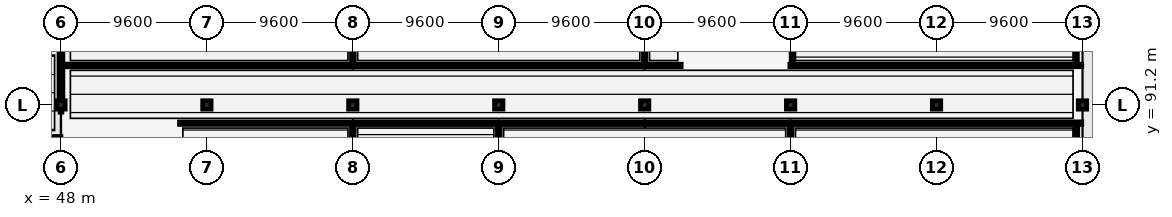
"""IFC4 building model, lengths in metres.
Left out: names, types, materials, properties, quantities, classifications, styles, units other than length and angle.
Written with IfcOpenShell. Run it as: python <this file> out.ifc"""

import sys

from ifc_helpers import new_model, si_unit, direction, frame, frame_2d, origin, origin_2d, place, context, subcontext, project, spatial, rectangle, extrude, element, fill, save


model = new_model("IFC4")
c1 = context("Model", 3, precision=1e-05, world=origin(), true_north=direction((0.0, 1.0)))
c2 = subcontext(c1, "Body", "Model", "MODEL_VIEW")
j1 = project(units=[si_unit("LENGTHUNIT", "METRE"), si_unit("PLANEANGLEUNIT", "RADIAN")], contexts=[c1])
p1 = place(None, origin())
s1 = spatial("IfcSite", under=j1, at=p1, CompositionType="ELEMENT")
p2 = place(p1, origin())
s2 = spatial("IfcBuilding", under=s1, at=p2, CompositionType="ELEMENT")
p3 = place(p2, frame((0.0, 0.0, 4.8)))
s3 = spatial("IfcBuildingStorey", under=s2, at=p3, CompositionType="ELEMENT", Elevation=4.8)
for number, where, z_axis, x_axis in (
    (1, (48.0, 91.2, 0.0), (0.0, 0.0, 1.0), (1.0, 0.0, 0.0)),
    (2, (57.6, 91.2, 0.0), (0.0, 0.0, 1.0), (1.0, 0.0, 0.0)),
    (3, (67.2, 91.2, 0.0), (0.0, 0.0, 1.0), (1.0, 0.0, 0.0)),
    (4, (76.8, 91.2, 0.0), (0.0, 0.0, 1.0), (1.0, 0.0, 0.0)),
    (5, (86.4, 91.2, 0.0), (0.0, 0.0, 1.0), (1.0, 0.0, 0.0)),
    (6, (96.0, 91.2, 0.0), (0.0, 0.0, 1.0), (1.0, 0.0, 0.0)),
    (7, (105.6, 91.2, 0.0), (0.0, 0.0, 1.0), (1.0, 0.0, 0.0)),
    (8, (115.2, 91.2, 0.0), (0.0, 0.0, 1.0), (1.0, 0.0, 0.0)),
):
    element("IfcColumn", number, at=place(p3, frame(where, z_axis=z_axis, x_axis=x_axis)), inside=s3, PredefinedType="COLUMN", context=c2, shape_type="SweptSolid", body=[
        extrude(rectangle(XDim=0.55, YDim=0.55, at=origin_2d()), origin(), (0.0, 0.0, 1.0), 4.8),
    ])
p4 = place(p3, frame((48.0, 91.475, 0.0), z_axis=(0.0, 0.0, 1.0), x_axis=(0.0, 1.0, 0.0)))
e9 = element("IfcWall", 9, at=p4, inside=s3, PredefinedType="STANDARD", context=c2, shape_type="SweptSolid", body=[
    extrude(rectangle(XDim=9.05, YDim=0.25, at=frame_2d((4.525, 0.0))), origin(), (0.0, 0.0, 1.0), 4.046),
])
p5 = place(p4, frame((6.2, 0.0, 1.05)))
e10 = element("IfcOpeningElement", 10, at=p5, cuts=e9, PredefinedType="OPENING", context=c2, shape_type="SweptSolid", body=[
    extrude(rectangle(XDim=1.12, YDim=1.44, at=frame_2d((0.56, 0.72))), frame((0.0, 0.135, 0.0), z_axis=(0.0, -1.0, 0.0), x_axis=(1.0, 0.0, 0.0)), (0.0, 0.0, 1.0), 0.27),
])
p6 = place(p4, frame((0.35, 0.0, 0.0)))
e11 = element("IfcOpeningElement", 11, at=p6, cuts=e9, PredefinedType="OPENING", context=c2, shape_type="SweptSolid", body=[
    extrude(rectangle(XDim=1.25, YDim=2.15, at=frame_2d((0.625, 1.075))), frame((0.0, 0.135, 0.0), z_axis=(0.0, -1.0, 0.0), x_axis=(1.0, 0.0, 0.0)), (0.0, 0.0, 1.0), 0.27),
])
p7 = place(p3, frame((38.4, 89.0, 0.0), z_axis=(0.0, 0.0, 1.0), x_axis=(1.0, 0.0, 0.0)))
e12 = element("IfcWall", 12, at=p7, inside=s3, PredefinedType="STANDARD", context=c2, shape_type="SweptSolid", body=[
    extrude(rectangle(XDim=9.6, YDim=0.25, at=frame_2d((4.8, 0.0))), origin(), (0.0, 0.0, 1.0), 2.106),
])
p8 = place(p3, frame((67.2, 81.4, 0.0), z_axis=(0.0, 0.0, 1.0), x_axis=(0.0, 1.0, 0.0)))
e13 = element("IfcWall", 13, at=p8, inside=s3, PredefinedType="PARTITIONING", context=c2, shape_type="SweptSolid", body=[
    extrude(rectangle(XDim=8.5, YDim=0.175, at=frame_2d((4.25, 0.0))), origin(), (0.0, 0.0, 1.0), 4.037),
])
p9 = place(p8, frame((3.45, 0.0, 0.0)))
e14 = element("IfcOpeningElement", 14, at=p9, cuts=e13, PredefinedType="OPENING", context=c2, shape_type="SweptSolid", body=[
    extrude(rectangle(XDim=1.6, YDim=2.15, at=frame_2d((0.8, 1.075))), frame((0.0, 0.097, 0.0), z_axis=(0.0, -1.0, 0.0), x_axis=(1.0, 0.0, 0.0)), (0.0, 0.0, 1.0), 0.195),
])
p10 = place(p3, frame((55.8, 90.0, 0.0), z_axis=(0.0, 0.0, 1.0), x_axis=(1.0, 0.0, 0.0)))
e15 = element("IfcWall", 15, at=p10, inside=s3, PredefinedType="PARTITIONING", context=c2, shape_type="SweptSolid", body=[
    extrude(rectangle(XDim=11.3, YDim=0.16, at=frame_2d((5.65, 0.0))), origin(), (0.0, 0.0, 1.0), 4.42),
])
p11 = place(p10, frame((4.75, 0.0, 0.0)))
e16 = element("IfcOpeningElement", 16, at=p11, cuts=e15, PredefinedType="OPENING", context=c2, shape_type="SweptSolid", body=[
    extrude(rectangle(XDim=1.8, YDim=2.15, at=frame_2d((0.9, 1.075))), frame((0.0, 0.09, 0.0), z_axis=(0.0, -1.0, 0.0), x_axis=(1.0, 0.0, 0.0)), (0.0, 0.0, 1.0), 0.18),
])
p12 = place(p3, frame((76.8, 81.4, 0.0), z_axis=(0.0, 0.0, 1.0), x_axis=(0.0, 1.0, 0.0)))
e17 = element("IfcWall", 17, at=p12, inside=s3, PredefinedType="PARTITIONING", context=c2, shape_type="SweptSolid", body=[
    extrude(rectangle(XDim=8.5, YDim=0.175, at=frame_2d((4.25, 0.0))), origin(), (0.0, 0.0, 1.0), 4.037),
])
p13 = place(p3, frame((67.3, 90.0, 0.0), z_axis=(0.0, 0.0, 1.0), x_axis=(1.0, 0.0, 0.0)))
e18 = element("IfcWall", 18, at=p13, inside=s3, PredefinedType="PARTITIONING", context=c2, shape_type="SweptSolid", body=[
    extrude(rectangle(XDim=9.4, YDim=0.175, at=frame_2d((4.7, 0.0))), origin(), (0.0, 0.0, 1.0), 4.42),
])
p14 = place(p13, frame((3.9, 0.0, 0.0)))
e19 = element("IfcOpeningElement", 19, at=p14, cuts=e18, PredefinedType="OPENING", context=c2, shape_type="SweptSolid", body=[
    extrude(rectangle(XDim=1.6, YDim=2.15, at=frame_2d((0.8, 1.075))), frame((0.0, 0.097, 0.0), z_axis=(0.0, -1.0, 0.0), x_axis=(1.0, 0.0, 0.0)), (0.0, 0.0, 1.0), 0.195),
])
p15 = place(p3, frame((96.0, 72.05, 0.0), z_axis=(0.0, 0.0, 1.0), x_axis=(0.0, 1.0, 0.0)))
e20 = element("IfcWall", 20, at=p15, inside=s3, PredefinedType="PARTITIONING", context=c2, shape_type="SweptSolid", body=[
    extrude(rectangle(XDim=17.85, YDim=0.175, at=frame_2d((8.925, 0.0))), origin(), (0.0, 0.0, 1.0), 4.037),
])
p16 = place(p3, frame((76.9, 90.0, 0.0), z_axis=(0.0, 0.0, 1.0), x_axis=(1.0, 0.0, 0.0)))
e21 = element("IfcWall", 21, at=p16, inside=s3, PredefinedType="PARTITIONING", context=c2, shape_type="SweptSolid", body=[
    extrude(rectangle(XDim=19.05, YDim=0.175, at=frame_2d((9.525, 0.0))), origin(), (0.0, 0.0, 1.0), 4.42),
])
p17 = place(p16, frame((6.216, 0.0, 0.0)))
e22 = element("IfcOpeningElement", 22, at=p17, cuts=e21, PredefinedType="OPENING", context=c2, shape_type="SweptSolid", body=[
    extrude(rectangle(XDim=1.6, YDim=2.15, at=frame_2d((0.8, 1.075))), frame((0.0, 0.097, 0.0), z_axis=(0.0, -1.0, 0.0), x_axis=(1.0, 0.0, 0.0)), (0.0, 0.0, 1.0), 0.195),
])
p18 = place(p3, frame((96.03, 90.0, 0.0), z_axis=(0.0, 0.0, 1.0), x_axis=(1.0, 0.0, 0.0)))
e23 = element("IfcWall", 23, at=p18, inside=s3, PredefinedType="PARTITIONING", context=c2, shape_type="SweptSolid", body=[
    extrude(rectangle(XDim=19.12, YDim=0.175, at=frame_2d((9.56, 0.0))), origin(), (0.0, 0.0, 1.0), 4.42),
])
p19 = place(p18, frame((6.24, 0.0, 0.0)))
e24 = element("IfcOpeningElement", 24, at=p19, cuts=e23, PredefinedType="OPENING", context=c2, shape_type="SweptSolid", body=[
    extrude(rectangle(XDim=1.6, YDim=2.15, at=frame_2d((0.8, 1.075))), frame((0.0, 0.097, 0.0), z_axis=(0.0, -1.0, 0.0), x_axis=(1.0, 0.0, 0.0)), (0.0, 0.0, 1.0), 0.195),
])
p20 = place(p3, frame((86.5, 93.8, 0.0), z_axis=(0.0, 0.0, 1.0), x_axis=(1.0, 0.0, 0.0)))
e25 = element("IfcWall", 25, at=p20, inside=s3, PredefinedType="PARTITIONING", context=c2, shape_type="SweptSolid", body=[
    extrude(rectangle(XDim=2.3, YDim=0.16, at=frame_2d((1.15, 0.0))), origin(), (0.0, 0.0, 1.0), 4.42),
])
p21 = place(p20, frame((0.25, 0.0, 0.0)))
e26 = element("IfcOpeningElement", 26, at=p21, cuts=e25, PredefinedType="OPENING", context=c2, shape_type="SweptSolid", body=[
    extrude(rectangle(XDim=1.8, YDim=2.15, at=frame_2d((0.9, 1.075))), frame((0.0, 0.09, 0.0), z_axis=(0.0, -1.0, 0.0), x_axis=(1.0, 0.0, 0.0)), (0.0, 0.0, 1.0), 0.18),
])
p22 = place(p3, frame((48.05, 93.8, 0.0), z_axis=(0.0, 0.0, 1.0), x_axis=(1.0, 0.0, 0.0)))
e27 = element("IfcWall", 27, at=p22, inside=s3, PredefinedType="PARTITIONING", context=c2, shape_type="SweptSolid", body=[
    extrude(rectangle(XDim=19.05, YDim=0.175, at=frame_2d((9.525, 0.0))), origin(), (0.0, 0.0, 1.0), 4.42),
])
p23 = place(p22, frame((8.725, 0.0, 0.0)))
e28 = element("IfcOpeningElement", 28, at=p23, cuts=e27, PredefinedType="OPENING", context=c2, shape_type="SweptSolid", body=[
    extrude(rectangle(XDim=1.6, YDim=2.15, at=frame_2d((0.8, 1.075))), frame((0.0, 0.097, 0.0), z_axis=(0.0, -1.0, 0.0), x_axis=(1.0, 0.0, 0.0)), (0.0, 0.0, 1.0), 0.195),
])
p24 = place(p3, frame((67.3, 93.8, 0.0), z_axis=(0.0, 0.0, 1.0), x_axis=(1.0, 0.0, 0.0)))
e29 = element("IfcWall", 29, at=p24, inside=s3, PredefinedType="PARTITIONING", context=c2, shape_type="SweptSolid", body=[
    extrude(rectangle(XDim=19.0, YDim=0.16, at=frame_2d((9.5, 0.0))), origin(), (0.0, 0.0, 1.0), 4.42),
])
p25 = place(p24, frame((8.925, 0.0, 0.0)))
e30 = element("IfcOpeningElement", 30, at=p25, cuts=e29, PredefinedType="OPENING", context=c2, shape_type="SweptSolid", body=[
    extrude(rectangle(XDim=1.15, YDim=2.2, at=frame_2d((0.575, 1.1))), frame((0.0, 0.09, 0.0), z_axis=(0.0, -1.0, 0.0), x_axis=(1.0, 0.0, 0.0)), (0.0, 0.0, 1.0), 0.18),
])
p26 = place(p3, frame((95.95, 93.8, 0.0), z_axis=(0.0, 0.0, 1.0), x_axis=(1.0, 0.0, 0.0)))
e31 = element("IfcWall", 31, at=p26, inside=s3, PredefinedType="PARTITIONING", context=c2, shape_type="SweptSolid", body=[
    extrude(rectangle(XDim=19.2, YDim=0.16, at=frame_2d((9.6, 0.0))), origin(), (0.0, 0.0, 1.0), 4.42),
])
p27 = place(p26, frame((9.08, 0.0, 0.0)))
e32 = element("IfcOpeningElement", 32, at=p27, cuts=e31, PredefinedType="OPENING", context=c2, shape_type="SweptSolid", body=[
    extrude(rectangle(XDim=1.04, YDim=2.18, at=frame_2d((0.52, 1.09))), frame((0.0, 0.09, 0.0), z_axis=(0.0, -1.0, 0.0), x_axis=(1.0, 0.0, 0.0)), (0.0, 0.0, 1.0), 0.18),
])
p28 = place(p3, frame((86.4, 93.9, 0.0), z_axis=(0.0, 0.0, 1.0), x_axis=(0.0, 1.0, 0.0)))
e33 = element("IfcWall", 33, at=p28, inside=s3, PredefinedType="PARTITIONING", context=c2, shape_type="SweptSolid", body=[
    extrude(rectangle(XDim=24.05, YDim=0.16, at=frame_2d((12.025, 0.0))), origin(), (0.0, 0.0, 1.0), 4.037),
])
p29 = place(p28, frame((11.45, 0.0, 0.0)))
e34 = element("IfcOpeningElement", 34, at=p29, cuts=e33, PredefinedType="OPENING", context=c2, shape_type="SweptSolid", body=[
    extrude(rectangle(XDim=1.15, YDim=2.2, at=frame_2d((0.575, 1.1))), frame((0.0, 0.09, 0.0), z_axis=(0.0, -1.0, 0.0), x_axis=(1.0, 0.0, 0.0)), (0.0, 0.0, 1.0), 0.18),
])
p30 = place(p3, frame((67.2, 93.9, 0.0), z_axis=(0.0, 0.0, 1.0), x_axis=(0.0, 1.0, 0.0)))
e35 = element("IfcWall", 35, at=p30, inside=s3, PredefinedType="PARTITIONING", context=c2, shape_type="SweptSolid", body=[
    extrude(rectangle(XDim=24.05, YDim=0.175, at=frame_2d((12.025, 0.0))), origin(), (0.0, 0.0, 1.0), 4.037),
])
p31 = place(p3, frame((114.8, 72.05, 0.0), z_axis=(0.0, 0.0, 1.0), x_axis=(0.0, 1.0, 0.0)))
e36 = element("IfcWall", 36, at=p31, inside=s3, PredefinedType="PARTITIONING", context=c2, shape_type="SweptSolid", body=[
    extrude(rectangle(XDim=17.71, YDim=0.175, at=frame_2d((8.855, 0.0))), origin(), (0.0, 0.0, 1.0), 4.42),
])
p32 = place(p3, frame((96.1, 94.04, 0.0), z_axis=(0.0, 0.0, 1.0), x_axis=(0.0, 1.0, 0.0)))
e37 = element("IfcWall", 37, at=p32, inside=s3, PredefinedType="PARTITIONING", context=c2, shape_type="SweptSolid", body=[
    extrude(rectangle(XDim=12.62, YDim=0.125, at=frame_2d((6.31, 0.0))), origin(), (0.0, 0.0, 1.0), 4.037),
])
p33 = place(p3, frame((114.8, 94.04, 0.0), z_axis=(0.0, 0.0, 1.0), x_axis=(0.0, 1.0, 0.0)))
e38 = element("IfcWall", 38, at=p33, inside=s3, PredefinedType="PARTITIONING", context=c2, shape_type="SweptSolid", body=[
    extrude(rectangle(XDim=12.62, YDim=0.125, at=frame_2d((6.31, 0.0))), origin(), (0.0, 0.0, 1.0), 4.42),
])
p34 = place(p11, origin())
e39 = element("IfcDoor", 39, at=p34, inside=s3, OperationType="DOUBLE_DOOR_SINGLE_SWING", PredefinedType="DOOR", context=c2, shape_type="SweptSolid", body=[
    extrude(rectangle(XDim=1.8, YDim=2.15, at=frame_2d((0.9, 1.075))), frame((0.0, 0.025, 0.0), z_axis=(0.0, -1.0, 0.0), x_axis=(1.0, 0.0, 0.0)), (0.0, 0.0, 1.0), 0.05),
])
fill(e16, e39)
p35 = place(p14, origin())
e40 = element("IfcDoor", 40, at=p35, inside=s3, OperationType="DOUBLE_DOOR_SINGLE_SWING", PredefinedType="DOOR", context=c2, shape_type="SweptSolid", body=[
    extrude(rectangle(XDim=1.6, YDim=2.15, at=frame_2d((0.8, 1.075))), frame((0.0, 0.025, 0.0), z_axis=(0.0, -1.0, 0.0), x_axis=(1.0, 0.0, 0.0)), (0.0, 0.0, 1.0), 0.05),
])
fill(e19, e40)
p36 = place(p17, origin())
e41 = element("IfcDoor", 41, at=p36, inside=s3, OperationType="DOUBLE_DOOR_SINGLE_SWING", PredefinedType="DOOR", context=c2, shape_type="SweptSolid", body=[
    extrude(rectangle(XDim=1.6, YDim=2.15, at=frame_2d((0.8, 1.075))), frame((0.0, 0.025, 0.0), z_axis=(0.0, -1.0, 0.0), x_axis=(1.0, 0.0, 0.0)), (0.0, 0.0, 1.0), 0.05),
])
fill(e22, e41)
p37 = place(p19, origin())
e42 = element("IfcDoor", 42, at=p37, inside=s3, OperationType="DOUBLE_DOOR_SINGLE_SWING", PredefinedType="DOOR", context=c2, shape_type="SweptSolid", body=[
    extrude(rectangle(XDim=1.6, YDim=2.15, at=frame_2d((0.8, 1.075))), frame((0.0, 0.025, 0.0), z_axis=(0.0, -1.0, 0.0), x_axis=(1.0, 0.0, 0.0)), (0.0, 0.0, 1.0), 0.05),
])
fill(e24, e42)
p38 = place(p21, origin())
e43 = element("IfcDoor", 43, at=p38, inside=s3, OperationType="DOUBLE_DOOR_SINGLE_SWING", PredefinedType="DOOR", context=c2, shape_type="SweptSolid", body=[
    extrude(rectangle(XDim=1.8, YDim=2.15, at=frame_2d((0.9, 1.075))), frame((0.0, 0.025, 0.0), z_axis=(0.0, -1.0, 0.0), x_axis=(1.0, 0.0, 0.0)), (0.0, 0.0, 1.0), 0.05),
])
fill(e26, e43)
p39 = place(p23, origin())
e44 = element("IfcDoor", 44, at=p39, inside=s3, OperationType="DOUBLE_DOOR_SINGLE_SWING", PredefinedType="DOOR", context=c2, shape_type="SweptSolid", body=[
    extrude(rectangle(XDim=1.6, YDim=2.15, at=frame_2d((0.8, 1.075))), frame((0.0, 0.025, 0.0), z_axis=(0.0, -1.0, 0.0), x_axis=(1.0, 0.0, 0.0)), (0.0, 0.0, 1.0), 0.05),
])
fill(e28, e44)
p40 = place(p25, origin())
e45 = element("IfcDoor", 45, at=p40, inside=s3, OperationType="SINGLE_SWING_LEFT", PredefinedType="DOOR", context=c2, shape_type="SweptSolid", body=[
    extrude(rectangle(XDim=1.15, YDim=2.2, at=frame_2d((0.575, 1.1))), frame((0.0, 0.025, 0.0), z_axis=(0.0, -1.0, 0.0), x_axis=(1.0, 0.0, 0.0)), (0.0, 0.0, 1.0), 0.05),
])
fill(e30, e45)
p41 = place(p27, origin())
e46 = element("IfcDoor", 46, at=p41, inside=s3, OperationType="SINGLE_SWING_RIGHT", PredefinedType="DOOR", context=c2, shape_type="SweptSolid", body=[
    extrude(rectangle(XDim=1.04, YDim=2.18, at=frame_2d((0.52, 1.09))), frame((0.0, 0.025, 0.0), z_axis=(0.0, -1.0, 0.0), x_axis=(1.0, 0.0, 0.0)), (0.0, 0.0, 1.0), 0.05),
])
fill(e32, e46)
p42 = place(p6, origin())
e47 = element("IfcDoor", 47, at=p42, inside=s3, OperationType="SINGLE_SWING_RIGHT", PredefinedType="DOOR", context=c2, shape_type="SweptSolid", body=[
    extrude(rectangle(XDim=1.25, YDim=2.15, at=frame_2d((0.625, 1.075))), frame((0.0, 0.025, 0.0), z_axis=(0.0, -1.0, 0.0), x_axis=(1.0, 0.0, 0.0)), (0.0, 0.0, 1.0), 0.05),
])
fill(e11, e47)
save(model, sys.argv[1])
